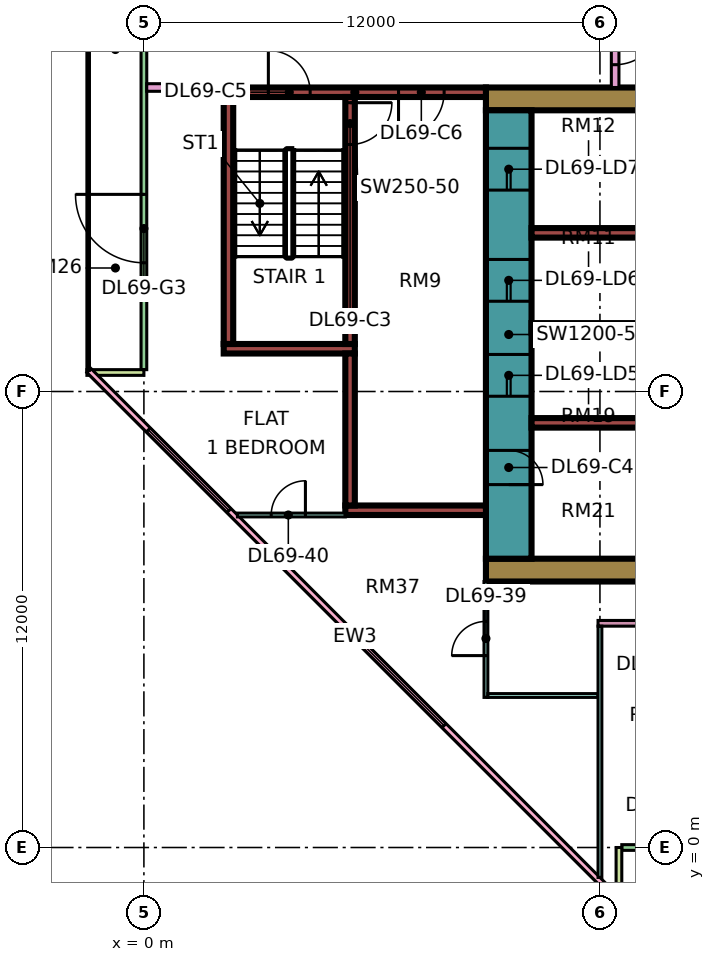
"""IFC4 building model, lengths in metres.
Left out: names, types, materials, properties, quantities, classifications, styles, units other than length and angle.
Written with IfcOpenShell. Run it as: python <this file> out.ifc"""

import sys

from ifc_helpers import new_model, si_unit, direction, frame, frame_2d, origin, place, context, subcontext, project, spatial, rectangle, extrude, element, fill, save


model = new_model("IFC4")
c1 = context("Model", 3, precision=1e-05, world=origin(), true_north=direction((0.0, 1.0)))
c2 = subcontext(c1, "Body", "Model", "MODEL_VIEW")
j1 = project(units=[si_unit("LENGTHUNIT", "METRE"), si_unit("PLANEANGLEUNIT", "RADIAN")], contexts=[c1])
p1 = place(None, origin())
s1 = spatial("IfcSite", under=j1, at=p1, CompositionType="ELEMENT")
p2 = place(p1, origin())
s2 = spatial("IfcBuilding", under=s1, at=p2, CompositionType="ELEMENT")
p3 = place(p2, frame((0.0, 0.0, 295.9)))
s3 = spatial("IfcBuildingStorey", under=s2, at=p3, CompositionType="ELEMENT", Elevation=295.9)
p4 = place(p3, frame((9.0, 7.3, 0.0), z_axis=(0.0, 0.0, 1.0), x_axis=(1.0, 0.0, 0.0)))
e1 = element("IfcWall", 1, at=p4, inside=s3, PredefinedType="SHEAR", context=c2, shape_type="SweptSolid", body=[
    extrude(rectangle(XDim=25.0, YDim=0.6, at=frame_2d((12.5, 0.0))), origin(), (0.0, 0.0, 1.0), 3.75),
])
p5 = place(p3, frame((9.0, 19.7, 0.0), z_axis=(0.0, 0.0, 1.0), x_axis=(1.0, 0.0, 0.0)))
e2 = element("IfcWall", 2, at=p5, inside=s3, PredefinedType="SHEAR", context=c2, shape_type="SweptSolid", body=[
    extrude(rectangle(XDim=25.0, YDim=0.6, at=frame_2d((12.5, 0.0))), origin(), (0.0, 0.0, 1.0), 3.75),
])
p6 = place(p5, frame((19.1, 0.0, 0.0)))
e3 = element("IfcOpeningElement", 3, at=p6, cuts=e2, PredefinedType="OPENING", context=c2, shape_type="SweptSolid", body=[
    extrude(rectangle(XDim=1.8, YDim=2.4, at=frame_2d((0.9, 1.2))), frame((0.0, 0.31, 0.0), z_axis=(0.0, -1.0, 0.0), x_axis=(1.0, 0.0, 0.0)), (0.0, 0.0, 1.0), 0.62),
])
p7 = place(p3, frame((9.6, 7.6, 0.0), z_axis=(0.0, 0.0, 1.0), x_axis=(0.0, 1.0, 0.0)))
e4 = element("IfcWall", 4, at=p7, inside=s3, PredefinedType="SHEAR", context=c2, shape_type="SweptSolid", body=[
    extrude(rectangle(XDim=11.8, YDim=1.2, at=frame_2d((5.9, 0.0))), origin(), (0.0, 0.0, 1.0), 3.75),
])
p8 = place(p7, frame((4.275, 0.0, 0.0)))
e5 = element("IfcOpeningElement", 5, at=p8, cuts=e4, PredefinedType="OPENING", context=c2, shape_type="SweptSolid", body=[
    extrude(rectangle(XDim=1.1, YDim=2.2, at=frame_2d((0.55, 1.1))), frame((0.0, 0.61, 0.0), z_axis=(0.0, -1.0, 0.0), x_axis=(1.0, 0.0, 0.0)), (0.0, 0.0, 1.0), 1.22),
])
p9 = place(p7, frame((6.775, 0.0, 0.0)))
e6 = element("IfcOpeningElement", 6, at=p9, cuts=e4, PredefinedType="OPENING", context=c2, shape_type="SweptSolid", body=[
    extrude(rectangle(XDim=1.1, YDim=2.2, at=frame_2d((0.55, 1.1))), frame((0.0, 0.61, 0.0), z_axis=(0.0, -1.0, 0.0), x_axis=(1.0, 0.0, 0.0)), (0.0, 0.0, 1.0), 1.22),
])
p10 = place(p7, frame((9.7, 0.0, 0.0)))
e7 = element("IfcOpeningElement", 7, at=p10, cuts=e4, PredefinedType="OPENING", context=c2, shape_type="SweptSolid", body=[
    extrude(rectangle(XDim=1.1, YDim=2.2, at=frame_2d((0.55, 1.1))), frame((0.0, 0.61, 0.0), z_axis=(0.0, -1.0, 0.0), x_axis=(1.0, 0.0, 0.0)), (0.0, 0.0, 1.0), 1.22),
])
p11 = place(p7, frame((1.95, 0.0, 0.0)))
e8 = element("IfcOpeningElement", 8, at=p11, cuts=e4, PredefinedType="OPENING", context=c2, shape_type="SweptSolid", body=[
    extrude(rectangle(XDim=0.9, YDim=2.1, at=frame_2d((0.45, 1.05))), frame((0.0, 0.61, 0.0), z_axis=(0.0, -1.0, 0.0), x_axis=(1.0, 0.0, 0.0)), (0.0, 0.0, 1.0), 1.22),
])
for number, where, z_axis, x_axis in (
    (9, (10.2, 11.175, 0.0), (0.0, 0.0, 1.0), (1.0, 0.0, 0.0)),
    (10, (10.2, 13.675, 0.0), (0.0, 0.0, 1.0), (1.0, 0.0, 0.0)),
    (11, (10.2, 16.175, 0.0), (0.0, 0.0, 1.0), (1.0, 0.0, 0.0)),
):
    element("IfcWall", number, at=place(p3, frame(where, z_axis=z_axis, x_axis=x_axis)), inside=s3, PredefinedType="SHEAR", context=c2, shape_type="SweptSolid", body=[
        extrude(rectangle(XDim=3.0, YDim=0.25, at=frame_2d((1.5, 0.0))), origin(), (0.0, 0.0, 1.0), 3.75),
    ])
p12 = place(p3, frame((2.1, 19.875, 0.0), z_axis=(0.0, 0.0, 1.0), x_axis=(1.0, 0.0, 0.0)))
e12 = element("IfcWall", 12, at=p12, inside=s3, PredefinedType="SHEAR", context=c2, shape_type="SweptSolid", body=[
    extrude(rectangle(XDim=6.9, YDim=0.25, at=frame_2d((3.45, 0.0))), origin(), (0.0, 0.0, 1.0), 3.75),
])
p13 = place(p12, frame((1.175, 0.0, 0.0)))
e13 = element("IfcOpeningElement", 13, at=p13, cuts=e12, PredefinedType="OPENING", context=c2, shape_type="SweptSolid", body=[
    extrude(rectangle(XDim=1.1, YDim=2.2, at=frame_2d((0.55, 1.1))), frame((0.0, 0.135, 0.0), z_axis=(0.0, -1.0, 0.0), x_axis=(1.0, 0.0, 0.0)), (0.0, 0.0, 1.0), 0.27),
])
p14 = place(p12, frame((4.6, 0.0, 0.0)))
e14 = element("IfcOpeningElement", 14, at=p14, cuts=e12, PredefinedType="OPENING", context=c2, shape_type="SweptSolid", body=[
    extrude(rectangle(XDim=1.2, YDim=2.2, at=frame_2d((0.6, 1.1))), frame((0.0, 0.135, 0.0), z_axis=(0.0, -1.0, 0.0), x_axis=(1.0, 0.0, 0.0)), (0.0, 0.0, 1.0), 0.27),
])
p15 = place(p3, frame((2.1, 13.125, 0.0), z_axis=(0.0, 0.0, 1.0), x_axis=(1.0, 0.0, 0.0)))
e15 = element("IfcWall", 15, at=p15, inside=s3, PredefinedType="SHEAR", context=c2, shape_type="SweptSolid", body=[
    extrude(rectangle(XDim=3.45, YDim=0.25, at=frame_2d((1.725, 0.0))), origin(), (0.0, 0.0, 1.0), 3.75),
])
p16 = place(p3, frame((2.225, 13.25, 0.0), z_axis=(0.0, 0.0, 1.0), x_axis=(0.0, 1.0, 0.0)))
e16 = element("IfcWall", 16, at=p16, inside=s3, PredefinedType="SHEAR", context=c2, shape_type="SweptSolid", body=[
    extrude(rectangle(XDim=6.5, YDim=0.25, at=frame_2d((3.25, 0.0))), origin(), (0.0, 0.0, 1.0), 3.75),
])
p17 = place(p3, frame((5.425, 13.25, 0.0), z_axis=(0.0, 0.0, 1.0), x_axis=(0.0, 1.0, 0.0)))
e17 = element("IfcWall", 17, at=p17, inside=s3, PredefinedType="SHEAR", context=c2, shape_type="SweptSolid", body=[
    extrude(rectangle(XDim=6.5, YDim=0.25, at=frame_2d((3.25, 0.0))), origin(), (0.0, 0.0, 1.0), 3.75),
])
p18 = place(p17, frame((5.25, 0.0, 0.0)))
e18 = element("IfcOpeningElement", 18, at=p18, cuts=e17, PredefinedType="OPENING", context=c2, shape_type="SweptSolid", body=[
    extrude(rectangle(XDim=1.1, YDim=2.2, at=frame_2d((0.55, 1.1))), frame((0.0, 0.135, 0.0), z_axis=(0.0, -1.0, 0.0), x_axis=(1.0, 0.0, 0.0)), (0.0, 0.0, 1.0), 0.27),
])
p19 = place(p3, frame((5.3, 8.875, 0.0), z_axis=(0.0, 0.0, 1.0), x_axis=(1.0, 0.0, 0.0)))
e19 = element("IfcWall", 19, at=p19, inside=s3, PredefinedType="SHEAR", context=c2, shape_type="SweptSolid", body=[
    extrude(rectangle(XDim=3.7, YDim=0.25, at=frame_2d((1.85, 0.0))), origin(), (0.0, 0.0, 1.0), 3.75),
])
p20 = place(p3, frame((5.425, 9.0, 0.0), z_axis=(0.0, 0.0, 1.0), x_axis=(0.0, 1.0, 0.0)))
e20 = element("IfcWall", 20, at=p20, inside=s3, PredefinedType="SHEAR", context=c2, shape_type="SweptSolid", body=[
    extrude(rectangle(XDim=4.0, YDim=0.25, at=frame_2d((2.0, 0.0))), origin(), (0.0, 0.0, 1.0), 3.75),
])
p21 = place(p3, frame((0.0, 23.925, 0.0), z_axis=(0.0, 0.0, 1.0), x_axis=(0.0, -1.0, 0.0)))
e21 = element("IfcWall", 21, at=p21, inside=s3, PredefinedType="SOLIDWALL", context=c2, shape_type="SweptSolid", body=[
    extrude(rectangle(XDim=11.35, YDim=0.15, at=frame_2d((5.675, 0.0))), origin(), (0.0, 0.0, 1.0), 3.35),
])
p22 = place(p21, frame((6.738, 0.0, 0.0)))
e22 = element("IfcOpeningElement", 22, at=p22, cuts=e21, PredefinedType="OPENING", context=c2, shape_type="SweptSolid", body=[
    extrude(rectangle(XDim=1.8, YDim=2.4, at=frame_2d((0.9, 1.2))), frame((0.0, 0.085, 0.0), z_axis=(0.0, -1.0, 0.0), x_axis=(1.0, 0.0, 0.0)), (0.0, 0.0, 1.0), 0.17),
])
p23 = place(p3, frame((-1.5, 12.5, 0.0), z_axis=(0.0, 0.0, 1.0), x_axis=(1.0, 0.0, 0.0)))
e23 = element("IfcWall", 23, at=p23, inside=s3, PredefinedType="SOLIDWALL", context=c2, shape_type="SweptSolid", body=[
    extrude(rectangle(XDim=1.5, YDim=0.15, at=frame_2d((0.75, 0.0))), origin(), (0.0, 0.0, 1.0), 3.35),
])
p24 = place(p3, frame((-1.447, 12.553, 0.0), z_axis=(0.0, 0.0, 1.0), x_axis=(0.707106781187, -0.707106781187, 0.0)))
e24 = element("IfcWall", 24, at=p24, inside=s3, PredefinedType="SOLIDWALL", context=c2, shape_type="SweptSolid", body=[
    extrude(rectangle(XDim=19.799, YDim=0.15, at=frame_2d((9.899, 0.0))), origin(), (0.0, 0.0, 1.0), 3.35),
])
p25 = place(p24, frame((2.212, 0.0, 0.45)))
e25 = element("IfcOpeningElement", 25, at=p25, cuts=e24, PredefinedType="OPENING", context=c2, shape_type="SweptSolid", body=[
    extrude(rectangle(XDim=3.0, YDim=2.4, at=frame_2d((1.5, 1.2))), frame((0.0, 0.085, 0.0), z_axis=(0.0, -1.0, 0.0), x_axis=(1.0, 0.0, 0.0)), (0.0, 0.0, 1.0), 0.17),
])
p26 = place(p24, frame((10.216, 0.0, 0.45)))
e26 = element("IfcOpeningElement", 26, at=p26, cuts=e24, PredefinedType="OPENING", context=c2, shape_type="SweptSolid", body=[
    extrude(rectangle(XDim=3.0, YDim=2.4, at=frame_2d((1.5, 1.2))), frame((0.0, 0.085, 0.0), z_axis=(0.0, -1.0, 0.0), x_axis=(1.0, 0.0, 0.0)), (0.0, 0.0, 1.0), 0.17),
])
p27 = place(p3, frame((12.575, 0.0, 0.0), z_axis=(0.0, 0.0, 1.0), x_axis=(1.0, 0.0, 0.0)))
e27 = element("IfcWall", 27, at=p27, inside=s3, PredefinedType="SOLIDWALL", context=c2, shape_type="SweptSolid", body=[
    extrude(rectangle(XDim=11.35, YDim=0.15, at=frame_2d((5.675, 0.0))), origin(), (0.0, 0.0, 1.0), 3.35),
])
p28 = place(p27, frame((0.613, 0.0, 0.0)))
e28 = element("IfcOpeningElement", 28, at=p28, cuts=e27, PredefinedType="OPENING", context=c2, shape_type="SweptSolid", body=[
    extrude(rectangle(XDim=1.2, YDim=2.4, at=frame_2d((0.6, 1.2))), frame((0.0, 0.085, 0.0), z_axis=(0.0, -1.0, 0.0), x_axis=(1.0, 0.0, 0.0)), (0.0, 0.0, 1.0), 0.17),
])
p29 = place(p27, frame((5.175, 0.0, 0.45)))
e29 = element("IfcOpeningElement", 29, at=p29, cuts=e27, PredefinedType="OPENING", context=c2, shape_type="SweptSolid", body=[
    extrude(rectangle(XDim=3.0, YDim=2.4, at=frame_2d((1.5, 1.2))), frame((0.0, 0.085, 0.0), z_axis=(0.0, -1.0, 0.0), x_axis=(1.0, 0.0, 0.0)), (0.0, 0.0, 1.0), 0.17),
])
p30 = place(p3, frame((12.5, -1.5, 0.0), z_axis=(0.0, 0.0, 1.0), x_axis=(0.0, 1.0, 0.0)))
e30 = element("IfcWall", 30, at=p30, inside=s3, PredefinedType="SOLIDWALL", context=c2, shape_type="SweptSolid", body=[
    extrude(rectangle(XDim=1.5, YDim=0.15, at=frame_2d((0.75, 0.0))), origin(), (0.0, 0.0, 1.0), 3.35),
])
p31 = place(p3, frame((0.074, 20.0, 0.0), z_axis=(0.0, 0.0, 1.0), x_axis=(1.0, 0.0, 0.0)))
e31 = element("IfcWall", 31, at=p31, inside=s3, PredefinedType="PARTITIONING", context=c2, shape_type="SweptSolid", body=[
    extrude(rectangle(XDim=2.026, YDim=0.2, at=frame_2d((1.013, 0.0))), origin(), (0.0, 0.0, 1.0), 3.35),
])
p32 = place(p3, frame((2.461, 8.75, 0.0), z_axis=(0.0, 0.0, 1.0), x_axis=(1.0, 0.0, 0.0)))
e32 = element("IfcWall", 32, at=p32, inside=s3, PredefinedType="PARTITIONING", context=c2, shape_type="SweptSolid", body=[
    extrude(rectangle(XDim=2.839, YDim=0.1, at=frame_2d((1.419, 0.0))), origin(), (0.0, 0.0, 1.0), 3.35),
])
p33 = place(p32, frame((0.889, 0.0, 0.0)))
e33 = element("IfcOpeningElement", 33, at=p33, cuts=e32, PredefinedType="OPENING", context=c2, shape_type="SweptSolid", body=[
    extrude(rectangle(XDim=0.9, YDim=2.1, at=frame_2d((0.45, 1.05))), frame((0.0, 0.06, 0.0), z_axis=(0.0, -1.0, 0.0), x_axis=(1.0, 0.0, 0.0)), (0.0, 0.0, 1.0), 0.12),
])
p34 = place(p3, frame((9.0, 3.95, 0.0), z_axis=(0.0, 0.0, 1.0), x_axis=(0.0, 1.0, 0.0)))
e34 = element("IfcWall", 34, at=p34, inside=s3, PredefinedType="PARTITIONING", context=c2, shape_type="SweptSolid", body=[
    extrude(rectangle(XDim=3.05, YDim=0.1, at=frame_2d((1.525, 0.0))), origin(), (0.0, 0.0, 1.0), 3.35),
])
p35 = place(p34, frame((1.1, 0.0, 0.0)))
e35 = element("IfcOpeningElement", 35, at=p35, cuts=e34, PredefinedType="OPENING", context=c2, shape_type="SweptSolid", body=[
    extrude(rectangle(XDim=0.9, YDim=2.1, at=frame_2d((0.45, 1.05))), frame((0.0, 0.06, 0.0), z_axis=(0.0, -1.0, 0.0), x_axis=(1.0, 0.0, 0.0)), (0.0, 0.0, 1.0), 0.12),
])
p36 = place(p3, frame((9.05, 4.0, 0.0), z_axis=(0.0, 0.0, 1.0), x_axis=(1.0, 0.0, 0.0)))
e36 = element("IfcWall", 36, at=p36, inside=s3, PredefinedType="PARTITIONING", context=c2, shape_type="SweptSolid", body=[
    extrude(rectangle(XDim=2.9, YDim=0.1, at=frame_2d((1.45, 0.0))), origin(), (0.0, 0.0, 1.0), 3.35),
])
p37 = place(p3, frame((11.95, 5.9, 0.0), z_axis=(0.0, 0.0, 1.0), x_axis=(1.0, 0.0, 0.0)))
e37 = element("IfcWall", 37, at=p37, inside=s3, PredefinedType="PARTITIONING", context=c2, shape_type="SweptSolid", body=[
    extrude(rectangle(XDim=21.1, YDim=0.15, at=frame_2d((10.55, 0.0))), origin(), (0.0, 0.0, 1.0), 3.35),
])
p38 = place(p37, frame((1.1, 0.0, 0.0)))
e38 = element("IfcOpeningElement", 38, at=p38, cuts=e37, PredefinedType="OPENING", context=c2, shape_type="SweptSolid", body=[
    extrude(rectangle(XDim=0.9, YDim=2.1, at=frame_2d((0.45, 1.05))), frame((0.0, 0.085, 0.0), z_axis=(0.0, -1.0, 0.0), x_axis=(1.0, 0.0, 0.0)), (0.0, 0.0, 1.0), 0.17),
])
p39 = place(p37, frame((16.1, 0.0, 0.0)))
e39 = element("IfcOpeningElement", 39, at=p39, cuts=e37, PredefinedType="OPENING", context=c2, shape_type="SweptSolid", body=[
    extrude(rectangle(XDim=0.9, YDim=2.1, at=frame_2d((0.45, 1.05))), frame((0.0, 0.085, 0.0), z_axis=(0.0, -1.0, 0.0), x_axis=(1.0, 0.0, 0.0)), (0.0, 0.0, 1.0), 0.17),
])
p40 = place(p37, frame((7.1, 0.0, 0.0)))
e40 = element("IfcOpeningElement", 40, at=p40, cuts=e37, PredefinedType="OPENING", context=c2, shape_type="SweptSolid", body=[
    extrude(rectangle(XDim=0.9, YDim=2.1, at=frame_2d((0.45, 1.05))), frame((0.0, 0.085, 0.0), z_axis=(0.0, -1.0, 0.0), x_axis=(1.0, 0.0, 0.0)), (0.0, 0.0, 1.0), 0.17),
])
p41 = place(p3, frame((12.0, -0.788, 0.0), z_axis=(0.0, 0.0, 1.0), x_axis=(0.0, 1.0, 0.0)))
e41 = element("IfcWall", 41, at=p41, inside=s3, PredefinedType="PARTITIONING", context=c2, shape_type="SweptSolid", body=[
    extrude(rectangle(XDim=6.613, YDim=0.1, at=frame_2d((3.306, 0.0))), origin(), (0.0, 0.0, 1.0), 3.35),
])
p42 = place(p3, frame((12.4, 20.0, 0.0), z_axis=(0.0, 0.0, 1.0), x_axis=(0.0, 1.0, 0.0)))
e42 = element("IfcWall", 42, at=p42, inside=s3, PredefinedType="PARTITIONING", context=c2, shape_type="SweptSolid", body=[
    extrude(rectangle(XDim=33.926, YDim=0.2, at=frame_2d((16.963, 0.0))), origin(), (0.0, 0.0, 1.0), 3.35),
])
p43 = place(p42, frame((32.1, 0.0, 0.0)))
e43 = element("IfcOpeningElement", 43, at=p43, cuts=e42, PredefinedType="OPENING", context=c2, shape_type="SweptSolid", body=[
    extrude(rectangle(XDim=1.0, YDim=2.1, at=frame_2d((0.5, 1.05))), frame((0.0, 0.11, 0.0), z_axis=(0.0, -1.0, 0.0), x_axis=(1.0, 0.0, 0.0)), (0.0, 0.0, 1.0), 0.22),
])
p44 = place(p42, frame((0.6, 0.0, 0.0)))
e44 = element("IfcOpeningElement", 44, at=p44, cuts=e42, PredefinedType="OPENING", context=c2, shape_type="SweptSolid", body=[
    extrude(rectangle(XDim=1.2, YDim=2.1, at=frame_2d((0.6, 1.05))), frame((0.0, 0.11, 0.0), z_axis=(0.0, -1.0, 0.0), x_axis=(1.0, 0.0, 0.0)), (0.0, 0.0, 1.0), 0.22),
])
p45 = place(p42, frame((14.1, 0.0, 0.0)))
e45 = element("IfcOpeningElement", 45, at=p45, cuts=e42, PredefinedType="OPENING", context=c2, shape_type="SweptSolid", body=[
    extrude(rectangle(XDim=1.0, YDim=2.1, at=frame_2d((0.5, 1.05))), frame((0.0, 0.11, 0.0), z_axis=(0.0, -1.0, 0.0), x_axis=(1.0, 0.0, 0.0)), (0.0, 0.0, 1.0), 0.22),
])
p46 = place(p22, frame((1.8, 0.0, 0.0), z_axis=(0.0, 0.0, 1.0), x_axis=(-1.0, 0.0, 0.0)))
e46 = element("IfcDoor", 46, at=p46, inside=s3, OperationType="DOUBLE_DOOR_SINGLE_SWING", PredefinedType="DOOR", context=c2, shape_type="SweptSolid", body=[
    extrude(rectangle(XDim=1.8, YDim=2.4, at=frame_2d((0.9, 1.2))), frame((0.0, 0.025, 0.0), z_axis=(0.0, -1.0, 0.0), x_axis=(1.0, 0.0, 0.0)), (0.0, 0.0, 1.0), 0.05),
])
fill(e22, e46)
p47 = place(p25, origin())
e47 = element("IfcWindow", 47, at=p47, inside=s3, PartitioningType="SINGLE_PANEL", PredefinedType="WINDOW", context=c2, shape_type="SweptSolid", body=[
    extrude(rectangle(XDim=3.0, YDim=2.4, at=frame_2d((1.5, 1.2))), frame((0.0, 0.03, 0.0), z_axis=(0.0, -1.0, 0.0), x_axis=(1.0, 0.0, 0.0)), (0.0, 0.0, 1.0), 0.06),
])
fill(e25, e47)
p48 = place(p26, origin())
e48 = element("IfcWindow", 48, at=p48, inside=s3, PartitioningType="SINGLE_PANEL", PredefinedType="WINDOW", context=c2, shape_type="SweptSolid", body=[
    extrude(rectangle(XDim=3.0, YDim=2.4, at=frame_2d((1.5, 1.2))), frame((0.0, 0.03, 0.0), z_axis=(0.0, -1.0, 0.0), x_axis=(1.0, 0.0, 0.0)), (0.0, 0.0, 1.0), 0.06),
])
fill(e26, e48)
p49 = place(p8, origin())
e49 = element("IfcDoor", 49, at=p49, inside=s3, OperationType="DOUBLE_DOOR_SLIDING", PredefinedType="DOOR", context=c2, shape_type="SweptSolid", body=[
    extrude(rectangle(XDim=1.1, YDim=2.2, at=frame_2d((0.55, 1.1))), frame((0.0, 0.025, 0.0), z_axis=(0.0, -1.0, 0.0), x_axis=(1.0, 0.0, 0.0)), (0.0, 0.0, 1.0), 0.05),
])
fill(e5, e49)
p50 = place(p9, origin())
e50 = element("IfcDoor", 50, at=p50, inside=s3, OperationType="DOUBLE_DOOR_SLIDING", PredefinedType="DOOR", context=c2, shape_type="SweptSolid", body=[
    extrude(rectangle(XDim=1.1, YDim=2.2, at=frame_2d((0.55, 1.1))), frame((0.0, 0.025, 0.0), z_axis=(0.0, -1.0, 0.0), x_axis=(1.0, 0.0, 0.0)), (0.0, 0.0, 1.0), 0.05),
])
fill(e6, e50)
p51 = place(p10, origin())
e51 = element("IfcDoor", 51, at=p51, inside=s3, OperationType="DOUBLE_DOOR_SLIDING", PredefinedType="DOOR", context=c2, shape_type="SweptSolid", body=[
    extrude(rectangle(XDim=1.1, YDim=2.2, at=frame_2d((0.55, 1.1))), frame((0.0, 0.025, 0.0), z_axis=(0.0, -1.0, 0.0), x_axis=(1.0, 0.0, 0.0)), (0.0, 0.0, 1.0), 0.05),
])
fill(e7, e51)
p52 = place(p18, origin())
e52 = element("IfcDoor", 52, at=p52, inside=s3, OperationType="SINGLE_SWING_RIGHT", PredefinedType="DOOR", context=c2, shape_type="SweptSolid", body=[
    extrude(rectangle(XDim=1.1, YDim=2.2, at=frame_2d((0.55, 1.1))), frame((0.0, 0.025, 0.0), z_axis=(0.0, -1.0, 0.0), x_axis=(1.0, 0.0, 0.0)), (0.0, 0.0, 1.0), 0.05),
])
fill(e18, e52)
p53 = place(p11, frame((0.9, 0.0, 0.0), z_axis=(0.0, 0.0, 1.0), x_axis=(-1.0, 0.0, 0.0)))
e53 = element("IfcDoor", 53, at=p53, inside=s3, OperationType="SINGLE_SWING_LEFT", PredefinedType="DOOR", context=c2, shape_type="SweptSolid", body=[
    extrude(rectangle(XDim=0.9, YDim=2.1, at=frame_2d((0.45, 1.05))), frame((0.0, 0.025, 0.0), z_axis=(0.0, -1.0, 0.0), x_axis=(1.0, 0.0, 0.0)), (0.0, 0.0, 1.0), 0.05),
])
fill(e8, e53)
p54 = place(p13, origin())
e54 = element("IfcDoor", 54, at=p54, inside=s3, OperationType="SINGLE_SWING_LEFT", PredefinedType="DOOR", context=c2, shape_type="SweptSolid", body=[
    extrude(rectangle(XDim=1.1, YDim=2.2, at=frame_2d((0.55, 1.1))), frame((0.0, 0.025, 0.0), z_axis=(0.0, -1.0, 0.0), x_axis=(1.0, 0.0, 0.0)), (0.0, 0.0, 1.0), 0.05),
])
fill(e13, e54)
p55 = place(p14, frame((1.2, 0.0, 0.0), z_axis=(0.0, 0.0, 1.0), x_axis=(-1.0, 0.0, 0.0)))
e55 = element("IfcDoor", 55, at=p55, inside=s3, OperationType="SINGLE_SWING_LEFT", PredefinedType="DOOR", context=c2, shape_type="SweptSolid", body=[
    extrude(rectangle(XDim=1.2, YDim=2.2, at=frame_2d((0.6, 1.1))), frame((0.0, 0.025, 0.0), z_axis=(0.0, -1.0, 0.0), x_axis=(1.0, 0.0, 0.0)), (0.0, 0.0, 1.0), 0.05),
])
fill(e14, e55)
p56 = place(p44, origin())
e56 = element("IfcDoor", 56, at=p56, inside=s3, OperationType="SINGLE_SWING_RIGHT", PredefinedType="DOOR", context=c2, shape_type="SweptSolid", body=[
    extrude(rectangle(XDim=1.2, YDim=2.1, at=frame_2d((0.6, 1.05))), frame((0.0, 0.025, 0.0), z_axis=(0.0, -1.0, 0.0), x_axis=(1.0, 0.0, 0.0)), (0.0, 0.0, 1.0), 0.05),
])
fill(e44, e56)
p57 = place(p35, origin())
e57 = element("IfcDoor", 57, at=p57, inside=s3, OperationType="SINGLE_SWING_LEFT", PredefinedType="DOOR", context=c2, shape_type="SweptSolid", body=[
    extrude(rectangle(XDim=0.9, YDim=2.1, at=frame_2d((0.45, 1.05))), frame((0.0, 0.025, 0.0), z_axis=(0.0, -1.0, 0.0), x_axis=(1.0, 0.0, 0.0)), (0.0, 0.0, 1.0), 0.05),
])
fill(e35, e57)
p58 = place(p33, frame((0.9, 0.0, 0.0), z_axis=(0.0, 0.0, 1.0), x_axis=(-1.0, 0.0, 0.0)))
e58 = element("IfcDoor", 58, at=p58, inside=s3, OperationType="SINGLE_SWING_RIGHT", PredefinedType="DOOR", context=c2, shape_type="SweptSolid", body=[
    extrude(rectangle(XDim=0.9, YDim=2.1, at=frame_2d((0.45, 1.05))), frame((0.0, 0.025, 0.0), z_axis=(0.0, -1.0, 0.0), x_axis=(1.0, 0.0, 0.0)), (0.0, 0.0, 1.0), 0.05),
])
fill(e33, e58)
save(model, sys.argv[1])
